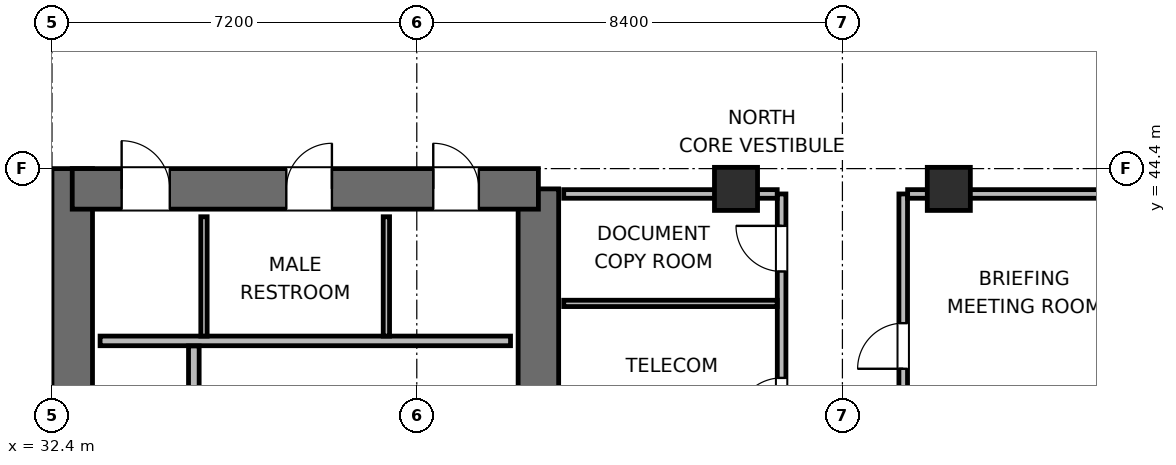
"""IFC4 building model, lengths in metres.
Left out: names, types, materials, properties, quantities, classifications, styles, units other than length and angle.
Written with IfcOpenShell. Run it as: python <this file> out.ifc"""

import sys

from ifc_helpers import new_model, si_unit, direction, frame, frame_2d, origin, origin_2d, place, context, subcontext, project, spatial, rectangle, extrude, element, fill, save


model = new_model("IFC4")
c1 = context("Model", 3, precision=1e-05, world=origin(), true_north=direction((0.0, 1.0)))
c2 = subcontext(c1, "Body", "Model", "MODEL_VIEW")
j1 = project(units=[si_unit("LENGTHUNIT", "METRE"), si_unit("PLANEANGLEUNIT", "RADIAN")], contexts=[c1])
p1 = place(None, origin())
s1 = spatial("IfcSite", under=j1, at=p1, CompositionType="ELEMENT")
p2 = place(p1, origin())
s2 = spatial("IfcBuilding", under=s1, at=p2, CompositionType="ELEMENT")
p3 = place(p2, frame((0.0, 0.0, 93.6)))
s3 = spatial("IfcBuildingStorey", under=s2, at=p3, CompositionType="ELEMENT", Elevation=93.6)
p4 = place(p3, frame((32.8, 27.6, 0.0), z_axis=(0.0, 0.0, 1.0), x_axis=(0.0, 1.0, 0.0)))
e1 = element("IfcWall", 1, at=p4, inside=s3, PredefinedType="SHEAR", context=c2, shape_type="SweptSolid", body=[
    extrude(rectangle(XDim=16.8, YDim=0.8, at=frame_2d((8.4, 0.0))), origin(), (0.0, 0.0, 1.0), 3.9),
])
p5 = place(p3, frame((42.0, 37.8, 0.0), z_axis=(0.0, 0.0, 1.0), x_axis=(0.0, 1.0, 0.0)))
e2 = element("IfcWall", 2, at=p5, inside=s3, PredefinedType="SHEAR", context=c2, shape_type="SweptSolid", body=[
    extrude(rectangle(XDim=6.2, YDim=0.8, at=frame_2d((3.1, 0.0))), origin(), (0.0, 0.0, 1.0), 3.9),
])
p6 = place(p3, frame((32.8, 44.0, 0.0), z_axis=(0.0, 0.0, 1.0), x_axis=(1.0, 0.0, 0.0)))
e3 = element("IfcWall", 3, at=p6, inside=s3, PredefinedType="SHEAR", context=c2, shape_type="SweptSolid", body=[
    extrude(rectangle(XDim=9.2, YDim=0.8, at=frame_2d((4.6, 0.0))), origin(), (0.0, 0.0, 1.0), 3.9),
])
p7 = place(p6, frame((0.975, 0.0, 0.0)))
e4 = element("IfcOpeningElement", 4, at=p7, cuts=e3, PredefinedType="OPENING", context=c2, shape_type="SweptSolid", body=[
    extrude(rectangle(XDim=0.95, YDim=2.04, at=frame_2d((0.475, 1.02))), frame((0.0, 0.41, 0.0), z_axis=(0.0, -1.0, 0.0), x_axis=(1.0, 0.0, 0.0)), (0.0, 0.0, 1.0), 0.82),
])
p8 = place(p6, frame((4.225, 0.0, 0.0)))
e5 = element("IfcOpeningElement", 5, at=p8, cuts=e3, PredefinedType="OPENING", context=c2, shape_type="SweptSolid", body=[
    extrude(rectangle(XDim=0.9, YDim=2.02, at=frame_2d((0.45, 1.01))), frame((0.0, 0.41, 0.0), z_axis=(0.0, -1.0, 0.0), x_axis=(1.0, 0.0, 0.0)), (0.0, 0.0, 1.0), 0.82),
])
p9 = place(p6, frame((7.125, 0.0, 0.0)))
e6 = element("IfcOpeningElement", 6, at=p9, cuts=e3, PredefinedType="OPENING", context=c2, shape_type="SweptSolid", body=[
    extrude(rectangle(XDim=0.9, YDim=2.02, at=frame_2d((0.45, 1.01))), frame((0.0, 0.41, 0.0), z_axis=(0.0, -1.0, 0.0), x_axis=(1.0, 0.0, 0.0)), (0.0, 0.0, 1.0), 0.82),
])
for number, where, z_axis, x_axis in (
    (7, (45.9, 44.0, 0.0), (0.0, 0.0, 1.0), (1.0, 0.0, 0.0)),
    (8, (50.1, 44.0, 0.0), (0.0, 0.0, 1.0), (1.0, 0.0, 0.0)),
):
    element("IfcColumn", number, at=place(p3, frame(where, z_axis=z_axis, x_axis=x_axis)), inside=s3, PredefinedType="COLUMN", context=c2, shape_type="SweptSolid", body=[
        extrude(rectangle(XDim=0.85, YDim=0.85, at=origin_2d()), origin(), (0.0, 0.0, 1.0), 3.9),
    ])
p10 = place(p3, frame((33.35, 41.0, 0.0), z_axis=(0.0, 0.0, 1.0), x_axis=(1.0, 0.0, 0.0)))
e9 = element("IfcWall", 9, at=p10, inside=s3, PredefinedType="PLUMBINGWALL", context=c2, shape_type="SweptSolid", body=[
    extrude(rectangle(XDim=8.1, YDim=0.19, at=frame_2d((4.05, 0.0))), origin(), (0.0, 0.0, 1.0), 3.64),
])
for number, where, z_axis, x_axis in (
    (10, (35.4, 41.095, 0.0), (0.0, 0.0, 1.0), (0.0, 1.0, 0.0)),
    (11, (39.0, 41.095, 0.0), (0.0, 0.0, 1.0), (0.0, 1.0, 0.0)),
):
    element("IfcWall", number, at=place(p3, frame(where, z_axis=z_axis, x_axis=x_axis)), inside=s3, PredefinedType="PARTITIONING", context=c2, shape_type="SweptSolid", body=[
        extrude(rectangle(XDim=2.355, YDim=0.125, at=frame_2d((1.177, 0.0))), origin(), (0.0, 0.0, 1.0), 3.64),
    ])
p11 = place(p3, frame((35.2, 39.58, 0.0), z_axis=(0.0, 0.0, 1.0), x_axis=(0.0, 1.0, 0.0)))
e12 = element("IfcWall", 12, at=p11, inside=s3, PredefinedType="PARTITIONING", context=c2, shape_type="SweptSolid", body=[
    extrude(rectangle(XDim=1.32, YDim=0.21, at=frame_2d((0.66, 0.0))), origin(), (0.0, 0.0, 1.0), 3.64),
])
p12 = place(p3, frame((46.8, 37.9, 0.0), z_axis=(0.0, 0.0, 1.0), x_axis=(0.0, 1.0, 0.0)))
e13 = element("IfcWall", 13, at=p12, inside=s3, PredefinedType="PARTITIONING", context=c2, shape_type="SweptSolid", body=[
    extrude(rectangle(XDim=6.0, YDim=0.17, at=frame_2d((3.0, 0.0))), origin(), (0.0, 0.0, 1.0), 3.64),
])
p13 = place(p12, frame((1.47, 0.0, 0.0)))
e14 = element("IfcOpeningElement", 14, at=p13, cuts=e13, PredefinedType="OPENING", context=c2, shape_type="SweptSolid", body=[
    extrude(rectangle(XDim=0.9, YDim=2.02, at=frame_2d((0.45, 1.01))), frame((0.0, 0.095, 0.0), z_axis=(0.0, -1.0, 0.0), x_axis=(1.0, 0.0, 0.0)), (0.0, 0.0, 1.0), 0.19),
])
p14 = place(p12, frame((4.47, 0.0, 0.0)))
e15 = element("IfcOpeningElement", 15, at=p14, cuts=e13, PredefinedType="OPENING", context=c2, shape_type="SweptSolid", body=[
    extrude(rectangle(XDim=0.9, YDim=2.02, at=frame_2d((0.45, 1.01))), frame((0.0, 0.095, 0.0), z_axis=(0.0, -1.0, 0.0), x_axis=(1.0, 0.0, 0.0)), (0.0, 0.0, 1.0), 0.19),
])
p15 = place(p3, frame((42.5, 43.9, 0.0), z_axis=(0.0, 0.0, 1.0), x_axis=(1.0, 0.0, 0.0)))
e16 = element("IfcWall", 16, at=p15, inside=s3, PredefinedType="PARTITIONING", context=c2, shape_type="SweptSolid", body=[
    extrude(rectangle(XDim=4.213, YDim=0.17, at=frame_2d((2.106, 0.0))), origin(), (0.0, 0.0, 1.0), 2.525),
])
p16 = place(p3, frame((42.5, 41.74, 0.0), z_axis=(0.0, 0.0, 1.0), x_axis=(1.0, 0.0, 0.0)))
e17 = element("IfcWall", 17, at=p16, inside=s3, PredefinedType="PARTITIONING", context=c2, shape_type="SweptSolid", body=[
    extrude(rectangle(XDim=4.213, YDim=0.125, at=frame_2d((2.106, 0.0))), origin(), (0.0, 0.0, 1.0), 3.64),
])
p17 = place(p3, frame((49.2, 37.9, 0.0), z_axis=(0.0, 0.0, 1.0), x_axis=(0.0, 1.0, 0.0)))
e18 = element("IfcWall", 18, at=p17, inside=s3, PredefinedType="PARTITIONING", context=c2, shape_type="SweptSolid", body=[
    extrude(rectangle(XDim=6.0, YDim=0.17, at=frame_2d((3.0, 0.0))), origin(), (0.0, 0.0, 1.0), 3.64),
])
p18 = place(p17, frame((2.55, 0.0, 0.0)))
e19 = element("IfcOpeningElement", 19, at=p18, cuts=e18, PredefinedType="OPENING", context=c2, shape_type="SweptSolid", body=[
    extrude(rectangle(XDim=0.9, YDim=2.02, at=frame_2d((0.45, 1.01))), frame((0.0, 0.095, 0.0), z_axis=(0.0, -1.0, 0.0), x_axis=(1.0, 0.0, 0.0)), (0.0, 0.0, 1.0), 0.19),
])
p19 = place(p3, frame((49.287, 43.9, 0.0), z_axis=(0.0, 0.0, 1.0), x_axis=(1.0, 0.0, 0.0)))
e20 = element("IfcWall", 20, at=p19, inside=s3, PredefinedType="PARTITIONING", context=c2, shape_type="SweptSolid", body=[
    extrude(rectangle(XDim=4.113, YDim=0.17, at=frame_2d((2.056, 0.0))), origin(), (0.0, 0.0, 1.0), 2.525),
])
p20 = place(p7, origin())
e21 = element("IfcDoor", 21, at=p20, inside=s3, OperationType="SINGLE_SWING_LEFT", PredefinedType="DOOR", context=c2, shape_type="SweptSolid", body=[
    extrude(rectangle(XDim=0.95, YDim=2.04, at=frame_2d((0.475, 1.02))), frame((0.0, 0.025, 0.0), z_axis=(0.0, -1.0, 0.0), x_axis=(1.0, 0.0, 0.0)), (0.0, 0.0, 1.0), 0.05),
])
fill(e4, e21)
p21 = place(p8, origin())
e22 = element("IfcDoor", 22, at=p21, inside=s3, OperationType="SINGLE_SWING_RIGHT", PredefinedType="DOOR", context=c2, shape_type="SweptSolid", body=[
    extrude(rectangle(XDim=0.9, YDim=2.02, at=frame_2d((0.45, 1.01))), frame((0.0, 0.025, 0.0), z_axis=(0.0, -1.0, 0.0), x_axis=(1.0, 0.0, 0.0)), (0.0, 0.0, 1.0), 0.05),
])
fill(e5, e22)
p22 = place(p9, origin())
e23 = element("IfcDoor", 23, at=p22, inside=s3, OperationType="SINGLE_SWING_LEFT", PredefinedType="DOOR", context=c2, shape_type="SweptSolid", body=[
    extrude(rectangle(XDim=0.9, YDim=2.02, at=frame_2d((0.45, 1.01))), frame((0.0, 0.025, 0.0), z_axis=(0.0, -1.0, 0.0), x_axis=(1.0, 0.0, 0.0)), (0.0, 0.0, 1.0), 0.05),
])
fill(e6, e23)
p23 = place(p13, origin())
e24 = element("IfcDoor", 24, at=p23, inside=s3, OperationType="SINGLE_SWING_LEFT", PredefinedType="DOOR", context=c2, shape_type="SweptSolid", body=[
    extrude(rectangle(XDim=0.9, YDim=2.02, at=frame_2d((0.45, 1.01))), frame((0.0, 0.025, 0.0), z_axis=(0.0, -1.0, 0.0), x_axis=(1.0, 0.0, 0.0)), (0.0, 0.0, 1.0), 0.05),
])
fill(e14, e24)
p24 = place(p14, origin())
e25 = element("IfcDoor", 25, at=p24, inside=s3, OperationType="SINGLE_SWING_RIGHT", PredefinedType="DOOR", context=c2, shape_type="SweptSolid", body=[
    extrude(rectangle(XDim=0.9, YDim=2.02, at=frame_2d((0.45, 1.01))), frame((0.0, 0.025, 0.0), z_axis=(0.0, -1.0, 0.0), x_axis=(1.0, 0.0, 0.0)), (0.0, 0.0, 1.0), 0.05),
])
fill(e15, e25)
p25 = place(p18, origin())
e26 = element("IfcDoor", 26, at=p25, inside=s3, OperationType="SINGLE_SWING_LEFT", PredefinedType="DOOR", context=c2, shape_type="SweptSolid", body=[
    extrude(rectangle(XDim=0.9, YDim=2.02, at=frame_2d((0.45, 1.01))), frame((0.0, 0.025, 0.0), z_axis=(0.0, -1.0, 0.0), x_axis=(1.0, 0.0, 0.0)), (0.0, 0.0, 1.0), 0.05),
])
fill(e19, e26)
save(model, sys.argv[1])
